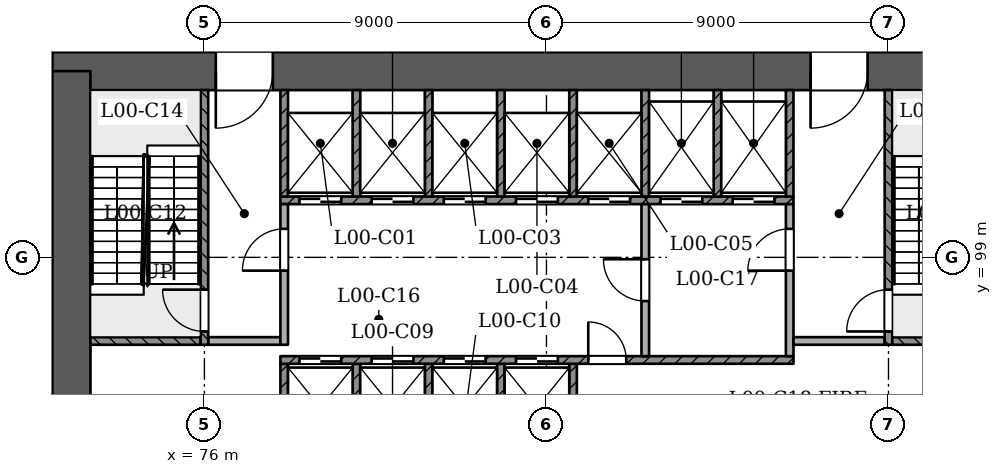
"""IFC4 building model, lengths in metres.
Left out: names, types, materials, properties, quantities, classifications, styles, units other than length and angle.
Written with IfcOpenShell. Run it as: python <this file> out.ifc"""

import sys

from ifc_helpers import new_model, si_unit, direction, frame, frame_2d, origin, place, context, subcontext, project, spatial, rectangle, extrude, element, fill, save


model = new_model("IFC4")
c1 = context("Model", 3, precision=1e-05, world=origin(), true_north=direction((0.0, 1.0)))
c2 = subcontext(c1, "Body", "Model", "MODEL_VIEW")
j1 = project(units=[si_unit("LENGTHUNIT", "METRE"), si_unit("PLANEANGLEUNIT", "RADIAN")], contexts=[c1])
p1 = place(None, origin())
s1 = spatial("IfcSite", under=j1, at=p1, CompositionType="ELEMENT")
p2 = place(p1, origin())
s2 = spatial("IfcBuilding", under=s1, at=p2, CompositionType="ELEMENT")
p3 = place(p2, origin())
s3 = spatial("IfcBuildingStorey", under=s2, at=p3, CompositionType="ELEMENT", Elevation=0.0)
p4 = place(p3, frame((97.5, 103.9, 0.0), z_axis=(0.0, 0.0, 1.0), x_axis=(-1.0, 0.0, 0.0)))
e1 = element("IfcWall", 1, at=p4, inside=s3, PredefinedType="SHEAR", context=c2, shape_type="SweptSolid", body=[
    extrude(rectangle(XDim=25.5, YDim=1.0, at=frame_2d((12.75, 0.0))), origin(), (0.0, 0.0, 1.0), 9.0),
])
p5 = place(p4, frame((19.7, 0.0, 0.0)))
e2 = element("IfcOpeningElement", 2, at=p5, cuts=e1, PredefinedType="OPENING", context=c2, shape_type="SweptSolid", body=[
    extrude(rectangle(XDim=1.5, YDim=2.1, at=frame_2d((0.75, 1.05))), frame((0.0, 0.51, 0.0), z_axis=(0.0, -1.0, 0.0), x_axis=(1.0, 0.0, 0.0)), (0.0, 0.0, 1.0), 1.021),
])
p6 = place(p4, frame((4.05, 0.0, 0.0)))
e3 = element("IfcOpeningElement", 3, at=p6, cuts=e1, PredefinedType="OPENING", context=c2, shape_type="SweptSolid", body=[
    extrude(rectangle(XDim=1.5, YDim=2.1, at=frame_2d((0.75, 1.05))), frame((0.0, 0.51, 0.0), z_axis=(0.0, -1.0, 0.0), x_axis=(1.0, 0.0, 0.0)), (0.0, 0.0, 1.0), 1.021),
])
p7 = place(p3, frame((72.5, 103.9, 0.0), z_axis=(0.0, 0.0, 1.0), x_axis=(0.0, -1.0, 0.0)))
e4 = element("IfcWall", 4, at=p7, inside=s3, PredefinedType="SHEAR", context=c2, shape_type="SweptSolid", body=[
    extrude(rectangle(XDim=11.5, YDim=1.0, at=frame_2d((5.75, 0.0))), origin(), (0.0, 0.0, 1.0), 9.0),
])
for number, where, z_axis, x_axis in (
    (5, (78.1, 93.4, 0.0), (0.0, 0.0, 1.0), (0.0, 1.0, 0.0)),
    (6, (80.0, 93.4, 0.0), (0.0, 0.0, 1.0), (0.0, 1.0, 0.0)),
    (7, (81.9, 93.4, 0.0), (0.0, 0.0, 1.0), (0.0, 1.0, 0.0)),
    (8, (83.8, 93.4, 0.0), (0.0, 0.0, 1.0), (0.0, 1.0, 0.0)),
    (9, (85.7, 93.4, 0.0), (0.0, 0.0, 1.0), (0.0, 1.0, 0.0)),
):
    element("IfcWall", number, at=place(p3, frame(where, z_axis=z_axis, x_axis=x_axis)), inside=s3, PredefinedType="SOLIDWALL", context=c2, shape_type="SweptSolid", body=[
        extrude(rectangle(XDim=2.8, YDim=0.2, at=frame_2d((1.4, 0.0))), origin(), (0.0, 0.0, 1.0), 8.55),
    ])
p8 = place(p3, frame((78.0, 96.3, 0.0), z_axis=(0.0, 0.0, 1.0), x_axis=(1.0, 0.0, 0.0)))
e10 = element("IfcWall", 10, at=p8, inside=s3, PredefinedType="SOLIDWALL", context=c2, shape_type="SweptSolid", body=[
    extrude(rectangle(XDim=13.5, YDim=0.2, at=frame_2d((6.75, 0.0))), origin(), (0.0, 0.0, 1.0), 8.55),
])
p9 = place(p8, frame((0.5, 0.0, 0.0)))
e11 = element("IfcOpeningElement", 11, at=p9, cuts=e10, PredefinedType="OPENING", context=c2, shape_type="SweptSolid", body=[
    extrude(rectangle(XDim=1.1, YDim=2.1, at=frame_2d((0.55, 1.05))), frame((0.0, 0.11, 0.0), z_axis=(0.0, -1.0, 0.0), x_axis=(1.0, 0.0, 0.0)), (0.0, 0.0, 1.0), 0.221),
])
p10 = place(p8, frame((2.4, 0.0, 0.0)))
e12 = element("IfcOpeningElement", 12, at=p10, cuts=e10, PredefinedType="OPENING", context=c2, shape_type="SweptSolid", body=[
    extrude(rectangle(XDim=1.1, YDim=2.1, at=frame_2d((0.55, 1.05))), frame((0.0, 0.11, 0.0), z_axis=(0.0, -1.0, 0.0), x_axis=(1.0, 0.0, 0.0)), (0.0, 0.0, 1.0), 0.221),
])
p11 = place(p8, frame((4.3, 0.0, 0.0)))
e13 = element("IfcOpeningElement", 13, at=p11, cuts=e10, PredefinedType="OPENING", context=c2, shape_type="SweptSolid", body=[
    extrude(rectangle(XDim=1.1, YDim=2.1, at=frame_2d((0.55, 1.05))), frame((0.0, 0.11, 0.0), z_axis=(0.0, -1.0, 0.0), x_axis=(1.0, 0.0, 0.0)), (0.0, 0.0, 1.0), 0.221),
])
p12 = place(p8, frame((6.2, 0.0, 0.0)))
e14 = element("IfcOpeningElement", 14, at=p12, cuts=e10, PredefinedType="OPENING", context=c2, shape_type="SweptSolid", body=[
    extrude(rectangle(XDim=1.1, YDim=2.1, at=frame_2d((0.55, 1.05))), frame((0.0, 0.11, 0.0), z_axis=(0.0, -1.0, 0.0), x_axis=(1.0, 0.0, 0.0)), (0.0, 0.0, 1.0), 0.221),
])
p13 = place(p8, frame((8.1, 0.0, 0.0)))
e15 = element("IfcOpeningElement", 15, at=p13, cuts=e10, PredefinedType="OPENING", context=c2, shape_type="SweptSolid", body=[
    extrude(rectangle(XDim=1.0, YDim=2.1, at=frame_2d((0.5, 1.05))), frame((0.0, 0.11, 0.0), z_axis=(0.0, -1.0, 0.0), x_axis=(1.0, 0.0, 0.0)), (0.0, 0.0, 1.0), 0.221),
])
p14 = place(p3, frame((87.6, 96.4, 0.0), z_axis=(0.0, 0.0, 1.0), x_axis=(0.0, 1.0, 0.0)))
e16 = element("IfcWall", 16, at=p14, inside=s3, PredefinedType="PARTITIONING", context=c2, shape_type="SweptSolid", body=[
    extrude(rectangle(XDim=4.0, YDim=0.2, at=frame_2d((2.0, 0.0))), origin(), (0.0, 0.0, 1.0), 8.55),
])
p15 = place(p14, frame((1.45, 0.0, 0.0)))
e17 = element("IfcOpeningElement", 17, at=p15, cuts=e16, PredefinedType="OPENING", context=c2, shape_type="SweptSolid", body=[
    extrude(rectangle(XDim=1.1, YDim=2.1, at=frame_2d((0.55, 1.05))), frame((0.0, 0.11, 0.0), z_axis=(0.0, -1.0, 0.0), x_axis=(1.0, 0.0, 0.0)), (0.0, 0.0, 1.0), 0.221),
])
p16 = place(p3, frame((91.4, 96.4, 0.0), z_axis=(0.0, 0.0, 1.0), x_axis=(0.0, 1.0, 0.0)))
e18 = element("IfcWall", 18, at=p16, inside=s3, PredefinedType="PARTITIONING", context=c2, shape_type="SweptSolid", body=[
    extrude(rectangle(XDim=4.0, YDim=0.2, at=frame_2d((2.0, 0.0))), origin(), (0.0, 0.0, 1.0), 8.55),
])
p17 = place(p16, frame((2.25, 0.0, 0.0)))
e19 = element("IfcOpeningElement", 19, at=p17, cuts=e18, PredefinedType="OPENING", context=c2, shape_type="SweptSolid", body=[
    extrude(rectangle(XDim=1.1, YDim=2.1, at=frame_2d((0.55, 1.05))), frame((0.0, 0.11, 0.0), z_axis=(0.0, -1.0, 0.0), x_axis=(1.0, 0.0, 0.0)), (0.0, 0.0, 1.0), 0.221),
])
p18 = place(p3, frame((73.0, 96.8, 0.0), z_axis=(0.0, 0.0, 1.0), x_axis=(1.0, 0.0, 0.0)))
e20 = element("IfcWall", 20, at=p18, inside=s3, PredefinedType="SOLIDWALL", context=c2, shape_type="SweptSolid", body=[
    extrude(rectangle(XDim=2.9, YDim=0.2, at=frame_2d((1.45, 0.0))), origin(), (0.0, 0.0, 1.0), 8.55),
])
p19 = place(p3, frame((76.0, 96.7, 0.0), z_axis=(0.0, 0.0, 1.0), x_axis=(0.0, 1.0, 0.0)))
e21 = element("IfcWall", 21, at=p19, inside=s3, PredefinedType="SOLIDWALL", context=c2, shape_type="SweptSolid", body=[
    extrude(rectangle(XDim=6.7, YDim=0.2, at=frame_2d((3.35, 0.0))), origin(), (0.0, 0.0, 1.0), 8.55),
])
p20 = place(p19, frame((0.35, 0.0, 0.0)))
e22 = element("IfcOpeningElement", 22, at=p20, cuts=e21, PredefinedType="OPENING", context=c2, shape_type="SweptSolid", body=[
    extrude(rectangle(XDim=1.1, YDim=2.1, at=frame_2d((0.55, 1.05))), frame((0.0, 0.11, 0.0), z_axis=(0.0, -1.0, 0.0), x_axis=(1.0, 0.0, 0.0)), (0.0, 0.0, 1.0), 0.221),
])
p21 = place(p3, frame((76.1, 96.8, 0.0), z_axis=(0.0, 0.0, 1.0), x_axis=(1.0, 0.0, 0.0)))
e23 = element("IfcWall", 23, at=p21, inside=s3, PredefinedType="PARTITIONING", context=c2, shape_type="SweptSolid", body=[
    extrude(rectangle(XDim=1.9, YDim=0.2, at=frame_2d((0.95, 0.0))), origin(), (0.0, 0.0, 1.0), 8.55),
])
p22 = place(p3, frame((78.1, 96.7, 0.0), z_axis=(0.0, 0.0, 1.0), x_axis=(0.0, 1.0, 0.0)))
e24 = element("IfcWall", 24, at=p22, inside=s3, PredefinedType="PARTITIONING", context=c2, shape_type="SweptSolid", body=[
    extrude(rectangle(XDim=3.7, YDim=0.2, at=frame_2d((1.85, 0.0))), origin(), (0.0, 0.0, 1.0), 8.55),
])
p23 = place(p22, frame((1.95, 0.0, 0.0)))
e25 = element("IfcOpeningElement", 25, at=p23, cuts=e24, PredefinedType="OPENING", context=c2, shape_type="SweptSolid", body=[
    extrude(rectangle(XDim=1.1, YDim=2.1, at=frame_2d((0.55, 1.05))), frame((0.0, 0.11, 0.0), z_axis=(0.0, -1.0, 0.0), x_axis=(1.0, 0.0, 0.0)), (0.0, 0.0, 1.0), 0.221),
])
p24 = place(p3, frame((91.5, 96.8, 0.0), z_axis=(0.0, 0.0, 1.0), x_axis=(1.0, 0.0, 0.0)))
e26 = element("IfcWall", 26, at=p24, inside=s3, PredefinedType="PARTITIONING", context=c2, shape_type="SweptSolid", body=[
    extrude(rectangle(XDim=2.4, YDim=0.2, at=frame_2d((1.2, 0.0))), origin(), (0.0, 0.0, 1.0), 8.55),
])
p25 = place(p3, frame((94.0, 96.7, 0.0), z_axis=(0.0, 0.0, 1.0), x_axis=(0.0, 1.0, 0.0)))
e27 = element("IfcWall", 27, at=p25, inside=s3, PredefinedType="SOLIDWALL", context=c2, shape_type="SweptSolid", body=[
    extrude(rectangle(XDim=6.7, YDim=0.2, at=frame_2d((3.35, 0.0))), origin(), (0.0, 0.0, 1.0), 8.55),
])
p26 = place(p25, frame((0.35, 0.0, 0.0)))
e28 = element("IfcOpeningElement", 28, at=p26, cuts=e27, PredefinedType="OPENING", context=c2, shape_type="SweptSolid", body=[
    extrude(rectangle(XDim=1.1, YDim=2.1, at=frame_2d((0.55, 1.05))), frame((0.0, 0.11, 0.0), z_axis=(0.0, -1.0, 0.0), x_axis=(1.0, 0.0, 0.0)), (0.0, 0.0, 1.0), 0.221),
])
p27 = place(p3, frame((94.1, 96.8, 0.0), z_axis=(0.0, 0.0, 1.0), x_axis=(1.0, 0.0, 0.0)))
e29 = element("IfcWall", 29, at=p27, inside=s3, PredefinedType="SOLIDWALL", context=c2, shape_type="SweptSolid", body=[
    extrude(rectangle(XDim=2.9, YDim=0.2, at=frame_2d((1.45, 0.0))), origin(), (0.0, 0.0, 1.0), 8.55),
])
p28 = place(p3, frame((78.0, 100.5, 0.0), z_axis=(0.0, 0.0, 1.0), x_axis=(1.0, 0.0, 0.0)))
e30 = element("IfcWall", 30, at=p28, inside=s3, PredefinedType="SOLIDWALL", context=c2, shape_type="SweptSolid", body=[
    extrude(rectangle(XDim=13.5, YDim=0.2, at=frame_2d((6.75, 0.0))), origin(), (0.0, 0.0, 1.0), 8.55),
])
p29 = place(p28, frame((0.5, 0.0, 0.0)))
e31 = element("IfcOpeningElement", 31, at=p29, cuts=e30, PredefinedType="OPENING", context=c2, shape_type="SweptSolid", body=[
    extrude(rectangle(XDim=1.1, YDim=2.1, at=frame_2d((0.55, 1.05))), frame((0.0, 0.11, 0.0), z_axis=(0.0, -1.0, 0.0), x_axis=(1.0, 0.0, 0.0)), (0.0, 0.0, 1.0), 0.221),
])
p30 = place(p28, frame((2.4, 0.0, 0.0)))
e32 = element("IfcOpeningElement", 32, at=p30, cuts=e30, PredefinedType="OPENING", context=c2, shape_type="SweptSolid", body=[
    extrude(rectangle(XDim=1.1, YDim=2.1, at=frame_2d((0.55, 1.05))), frame((0.0, 0.11, 0.0), z_axis=(0.0, -1.0, 0.0), x_axis=(1.0, 0.0, 0.0)), (0.0, 0.0, 1.0), 0.221),
])
p31 = place(p28, frame((4.3, 0.0, 0.0)))
e33 = element("IfcOpeningElement", 33, at=p31, cuts=e30, PredefinedType="OPENING", context=c2, shape_type="SweptSolid", body=[
    extrude(rectangle(XDim=1.1, YDim=2.1, at=frame_2d((0.55, 1.05))), frame((0.0, 0.11, 0.0), z_axis=(0.0, -1.0, 0.0), x_axis=(1.0, 0.0, 0.0)), (0.0, 0.0, 1.0), 0.221),
])
p32 = place(p28, frame((6.2, 0.0, 0.0)))
e34 = element("IfcOpeningElement", 34, at=p32, cuts=e30, PredefinedType="OPENING", context=c2, shape_type="SweptSolid", body=[
    extrude(rectangle(XDim=1.1, YDim=2.1, at=frame_2d((0.55, 1.05))), frame((0.0, 0.11, 0.0), z_axis=(0.0, -1.0, 0.0), x_axis=(1.0, 0.0, 0.0)), (0.0, 0.0, 1.0), 0.221),
])
p33 = place(p28, frame((8.1, 0.0, 0.0)))
e35 = element("IfcOpeningElement", 35, at=p33, cuts=e30, PredefinedType="OPENING", context=c2, shape_type="SweptSolid", body=[
    extrude(rectangle(XDim=1.1, YDim=2.1, at=frame_2d((0.55, 1.05))), frame((0.0, 0.11, 0.0), z_axis=(0.0, -1.0, 0.0), x_axis=(1.0, 0.0, 0.0)), (0.0, 0.0, 1.0), 0.221),
])
p34 = place(p28, frame((10.0, 0.0, 0.0)))
e36 = element("IfcOpeningElement", 36, at=p34, cuts=e30, PredefinedType="OPENING", context=c2, shape_type="SweptSolid", body=[
    extrude(rectangle(XDim=1.1, YDim=2.1, at=frame_2d((0.55, 1.05))), frame((0.0, 0.11, 0.0), z_axis=(0.0, -1.0, 0.0), x_axis=(1.0, 0.0, 0.0)), (0.0, 0.0, 1.0), 0.221),
])
p35 = place(p28, frame((11.9, 0.0, 0.0)))
e37 = element("IfcOpeningElement", 37, at=p35, cuts=e30, PredefinedType="OPENING", context=c2, shape_type="SweptSolid", body=[
    extrude(rectangle(XDim=1.1, YDim=2.1, at=frame_2d((0.55, 1.05))), frame((0.0, 0.11, 0.0), z_axis=(0.0, -1.0, 0.0), x_axis=(1.0, 0.0, 0.0)), (0.0, 0.0, 1.0), 0.221),
])
for number, where, z_axis, x_axis in (
    (38, (78.1, 100.6, 0.0), (0.0, 0.0, 1.0), (0.0, 1.0, 0.0)),
    (39, (80.0, 100.6, 0.0), (0.0, 0.0, 1.0), (0.0, 1.0, 0.0)),
    (40, (81.9, 100.6, 0.0), (0.0, 0.0, 1.0), (0.0, 1.0, 0.0)),
    (41, (83.8, 100.6, 0.0), (0.0, 0.0, 1.0), (0.0, 1.0, 0.0)),
    (42, (85.7, 100.6, 0.0), (0.0, 0.0, 1.0), (0.0, 1.0, 0.0)),
    (43, (87.6, 100.6, 0.0), (0.0, 0.0, 1.0), (0.0, 1.0, 0.0)),
    (44, (89.5, 100.6, 0.0), (0.0, 0.0, 1.0), (0.0, 1.0, 0.0)),
    (45, (91.4, 100.6, 0.0), (0.0, 0.0, 1.0), (0.0, 1.0, 0.0)),
):
    element("IfcWall", number, at=place(p3, frame(where, z_axis=z_axis, x_axis=x_axis)), inside=s3, PredefinedType="SOLIDWALL", context=c2, shape_type="SweptSolid", body=[
        extrude(rectangle(XDim=2.8, YDim=0.2, at=frame_2d((1.4, 0.0))), origin(), (0.0, 0.0, 1.0), 8.55),
    ])
p36 = place(p29, origin())
e46 = element("IfcDoor", 46, at=p36, inside=s3, OperationType="SLIDING_TO_RIGHT", PredefinedType="NOTDEFINED", context=c2, shape_type="SweptSolid", body=[
    extrude(rectangle(XDim=1.1, YDim=2.1, at=frame_2d((0.55, 1.05))), frame((0.0, 0.025, 0.0), z_axis=(0.0, -1.0, 0.0), x_axis=(1.0, 0.0, 0.0)), (0.0, 0.0, 1.0), 0.05),
])
fill(e31, e46)
p37 = place(p30, origin())
e47 = element("IfcDoor", 47, at=p37, inside=s3, OperationType="SLIDING_TO_LEFT", PredefinedType="NOTDEFINED", context=c2, shape_type="SweptSolid", body=[
    extrude(rectangle(XDim=1.1, YDim=2.1, at=frame_2d((0.55, 1.05))), frame((0.0, 0.025, 0.0), z_axis=(0.0, -1.0, 0.0), x_axis=(1.0, 0.0, 0.0)), (0.0, 0.0, 1.0), 0.05),
])
fill(e32, e47)
p38 = place(p31, origin())
e48 = element("IfcDoor", 48, at=p38, inside=s3, OperationType="SLIDING_TO_RIGHT", PredefinedType="NOTDEFINED", context=c2, shape_type="SweptSolid", body=[
    extrude(rectangle(XDim=1.1, YDim=2.1, at=frame_2d((0.55, 1.05))), frame((0.0, 0.025, 0.0), z_axis=(0.0, -1.0, 0.0), x_axis=(1.0, 0.0, 0.0)), (0.0, 0.0, 1.0), 0.05),
])
fill(e33, e48)
p39 = place(p32, origin())
e49 = element("IfcDoor", 49, at=p39, inside=s3, OperationType="SLIDING_TO_LEFT", PredefinedType="NOTDEFINED", context=c2, shape_type="SweptSolid", body=[
    extrude(rectangle(XDim=1.1, YDim=2.1, at=frame_2d((0.55, 1.05))), frame((0.0, 0.025, 0.0), z_axis=(0.0, -1.0, 0.0), x_axis=(1.0, 0.0, 0.0)), (0.0, 0.0, 1.0), 0.05),
])
fill(e34, e49)
p40 = place(p33, origin())
e50 = element("IfcDoor", 50, at=p40, inside=s3, OperationType="SLIDING_TO_RIGHT", PredefinedType="NOTDEFINED", context=c2, shape_type="SweptSolid", body=[
    extrude(rectangle(XDim=1.1, YDim=2.1, at=frame_2d((0.55, 1.05))), frame((0.0, 0.025, 0.0), z_axis=(0.0, -1.0, 0.0), x_axis=(1.0, 0.0, 0.0)), (0.0, 0.0, 1.0), 0.05),
])
fill(e35, e50)
p41 = place(p9, origin())
e51 = element("IfcDoor", 51, at=p41, inside=s3, OperationType="SLIDING_TO_RIGHT", PredefinedType="NOTDEFINED", context=c2, shape_type="SweptSolid", body=[
    extrude(rectangle(XDim=1.1, YDim=2.1, at=frame_2d((0.55, 1.05))), frame((0.0, 0.025, 0.0), z_axis=(0.0, -1.0, 0.0), x_axis=(1.0, 0.0, 0.0)), (0.0, 0.0, 1.0), 0.05),
])
fill(e11, e51)
p42 = place(p10, origin())
e52 = element("IfcDoor", 52, at=p42, inside=s3, OperationType="SLIDING_TO_LEFT", PredefinedType="NOTDEFINED", context=c2, shape_type="SweptSolid", body=[
    extrude(rectangle(XDim=1.1, YDim=2.1, at=frame_2d((0.55, 1.05))), frame((0.0, 0.025, 0.0), z_axis=(0.0, -1.0, 0.0), x_axis=(1.0, 0.0, 0.0)), (0.0, 0.0, 1.0), 0.05),
])
fill(e12, e52)
p43 = place(p11, origin())
e53 = element("IfcDoor", 53, at=p43, inside=s3, OperationType="SLIDING_TO_RIGHT", PredefinedType="NOTDEFINED", context=c2, shape_type="SweptSolid", body=[
    extrude(rectangle(XDim=1.1, YDim=2.1, at=frame_2d((0.55, 1.05))), frame((0.0, 0.025, 0.0), z_axis=(0.0, -1.0, 0.0), x_axis=(1.0, 0.0, 0.0)), (0.0, 0.0, 1.0), 0.05),
])
fill(e13, e53)
p44 = place(p12, origin())
e54 = element("IfcDoor", 54, at=p44, inside=s3, OperationType="SLIDING_TO_LEFT", PredefinedType="NOTDEFINED", context=c2, shape_type="SweptSolid", body=[
    extrude(rectangle(XDim=1.1, YDim=2.1, at=frame_2d((0.55, 1.05))), frame((0.0, 0.025, 0.0), z_axis=(0.0, -1.0, 0.0), x_axis=(1.0, 0.0, 0.0)), (0.0, 0.0, 1.0), 0.05),
])
fill(e14, e54)
p45 = place(p34, origin())
e55 = element("IfcDoor", 55, at=p45, inside=s3, OperationType="SLIDING_TO_RIGHT", PredefinedType="NOTDEFINED", context=c2, shape_type="SweptSolid", body=[
    extrude(rectangle(XDim=1.1, YDim=2.1, at=frame_2d((0.55, 1.05))), frame((0.0, 0.025, 0.0), z_axis=(0.0, -1.0, 0.0), x_axis=(1.0, 0.0, 0.0)), (0.0, 0.0, 1.0), 0.05),
])
fill(e36, e55)
p46 = place(p35, origin())
e56 = element("IfcDoor", 56, at=p46, inside=s3, OperationType="SLIDING_TO_LEFT", PredefinedType="NOTDEFINED", context=c2, shape_type="SweptSolid", body=[
    extrude(rectangle(XDim=1.1, YDim=2.1, at=frame_2d((0.55, 1.05))), frame((0.0, 0.025, 0.0), z_axis=(0.0, -1.0, 0.0), x_axis=(1.0, 0.0, 0.0)), (0.0, 0.0, 1.0), 0.05),
])
fill(e37, e56)
p47 = place(p20, origin())
e57 = element("IfcDoor", 57, at=p47, inside=s3, OperationType="SINGLE_SWING_RIGHT", PredefinedType="NOTDEFINED", context=c2, shape_type="SweptSolid", body=[
    extrude(rectangle(XDim=1.1, YDim=2.1, at=frame_2d((0.55, 1.05))), frame((0.0, 0.025, 0.0), z_axis=(0.0, -1.0, 0.0), x_axis=(1.0, 0.0, 0.0)), (0.0, 0.0, 1.0), 0.05),
])
fill(e22, e57)
p48 = place(p26, origin())
e58 = element("IfcDoor", 58, at=p48, inside=s3, OperationType="SINGLE_SWING_LEFT", PredefinedType="NOTDEFINED", context=c2, shape_type="SweptSolid", body=[
    extrude(rectangle(XDim=1.1, YDim=2.1, at=frame_2d((0.55, 1.05))), frame((0.0, 0.025, 0.0), z_axis=(0.0, -1.0, 0.0), x_axis=(1.0, 0.0, 0.0)), (0.0, 0.0, 1.0), 0.05),
])
fill(e28, e58)
p49 = place(p23, origin())
e59 = element("IfcDoor", 59, at=p49, inside=s3, OperationType="SINGLE_SWING_LEFT", PredefinedType="NOTDEFINED", context=c2, shape_type="SweptSolid", body=[
    extrude(rectangle(XDim=1.1, YDim=2.1, at=frame_2d((0.55, 1.05))), frame((0.0, 0.025, 0.0), z_axis=(0.0, -1.0, 0.0), x_axis=(1.0, 0.0, 0.0)), (0.0, 0.0, 1.0), 0.05),
])
fill(e25, e59)
p50 = place(p15, origin())
e60 = element("IfcDoor", 60, at=p50, inside=s3, OperationType="SINGLE_SWING_RIGHT", PredefinedType="NOTDEFINED", context=c2, shape_type="SweptSolid", body=[
    extrude(rectangle(XDim=1.1, YDim=2.1, at=frame_2d((0.55, 1.05))), frame((0.0, 0.025, 0.0), z_axis=(0.0, -1.0, 0.0), x_axis=(1.0, 0.0, 0.0)), (0.0, 0.0, 1.0), 0.05),
])
fill(e17, e60)
p51 = place(p17, origin())
e61 = element("IfcDoor", 61, at=p51, inside=s3, OperationType="SINGLE_SWING_LEFT", PredefinedType="NOTDEFINED", context=c2, shape_type="SweptSolid", body=[
    extrude(rectangle(XDim=1.1, YDim=2.1, at=frame_2d((0.55, 1.05))), frame((0.0, 0.025, 0.0), z_axis=(0.0, -1.0, 0.0), x_axis=(1.0, 0.0, 0.0)), (0.0, 0.0, 1.0), 0.05),
])
fill(e19, e61)
p52 = place(p13, origin())
e62 = element("IfcDoor", 62, at=p52, inside=s3, OperationType="SINGLE_SWING_LEFT", PredefinedType="NOTDEFINED", context=c2, shape_type="SweptSolid", body=[
    extrude(rectangle(XDim=1.0, YDim=2.1, at=frame_2d((0.5, 1.05))), frame((0.0, 0.025, 0.0), z_axis=(0.0, -1.0, 0.0), x_axis=(1.0, 0.0, 0.0)), (0.0, 0.0, 1.0), 0.05),
])
fill(e15, e62)
p53 = place(p5, frame((1.5, 0.0, 0.0), z_axis=(0.0, 0.0, 1.0), x_axis=(-1.0, 0.0, 0.0)))
e63 = element("IfcDoor", 63, at=p53, inside=s3, OperationType="SINGLE_SWING_RIGHT", PredefinedType="NOTDEFINED", context=c2, shape_type="SweptSolid", body=[
    extrude(rectangle(XDim=1.5, YDim=2.1, at=frame_2d((0.75, 1.05))), frame((0.0, 0.025, 0.0), z_axis=(0.0, -1.0, 0.0), x_axis=(1.0, 0.0, 0.0)), (0.0, 0.0, 1.0), 0.05),
])
fill(e2, e63)
p54 = place(p6, frame((1.5, 0.0, 0.0), z_axis=(0.0, 0.0, 1.0), x_axis=(-1.0, 0.0, 0.0)))
e64 = element("IfcDoor", 64, at=p54, inside=s3, OperationType="SINGLE_SWING_RIGHT", PredefinedType="NOTDEFINED", context=c2, shape_type="SweptSolid", body=[
    extrude(rectangle(XDim=1.5, YDim=2.1, at=frame_2d((0.75, 1.05))), frame((0.0, 0.025, 0.0), z_axis=(0.0, -1.0, 0.0), x_axis=(1.0, 0.0, 0.0)), (0.0, 0.0, 1.0), 0.05),
])
fill(e3, e64)
save(model, sys.argv[1])
